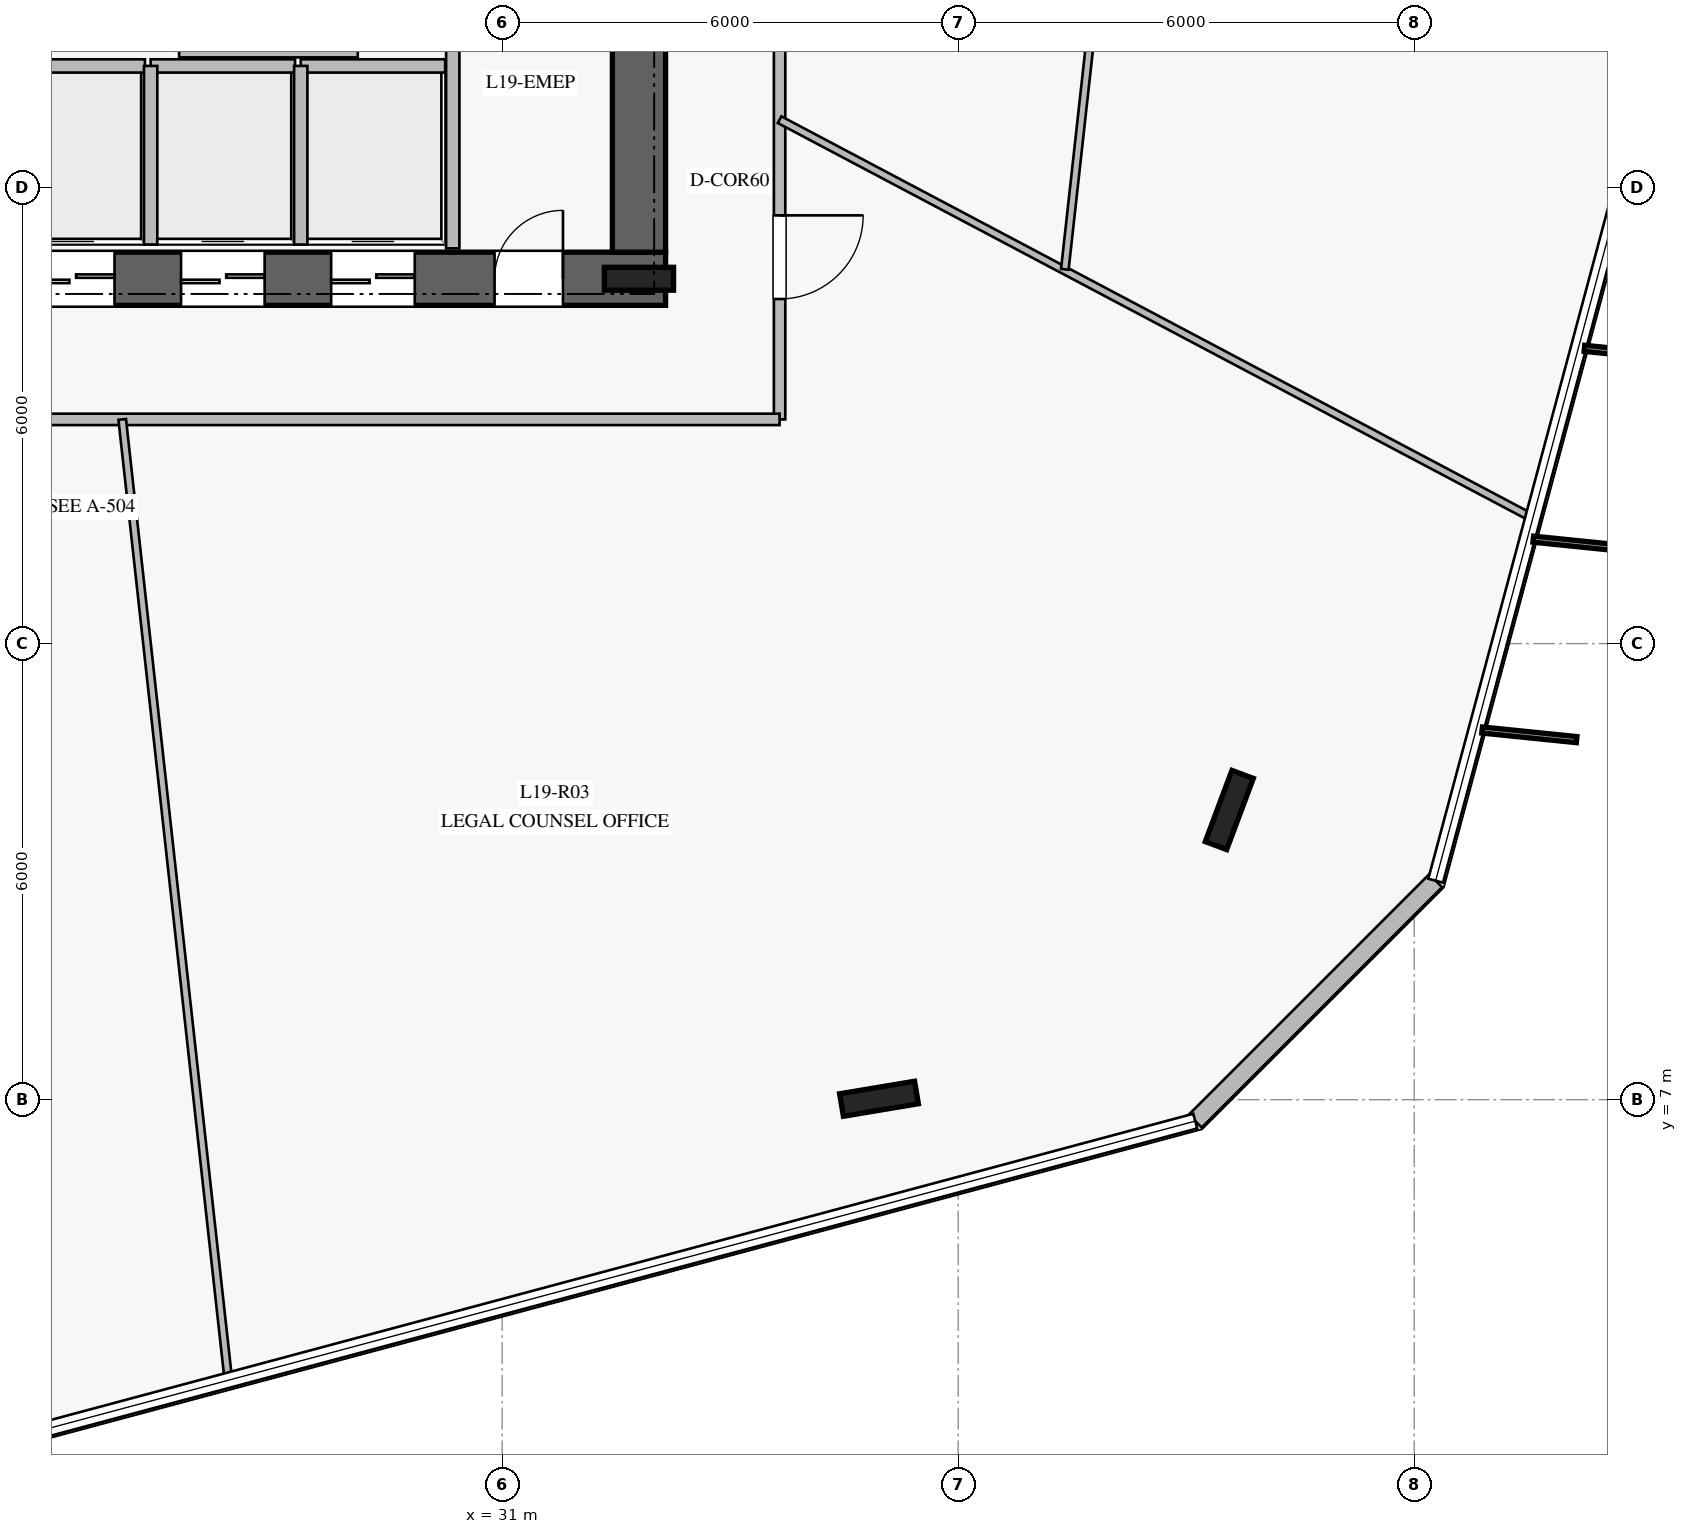
"""IFC4 building model, lengths in metres.
Left out: names, types, materials, properties, quantities, classifications, styles, units other than length and angle.
Written with IfcOpenShell. Run it as: python <this file> out.ifc"""

import sys

from ifc_helpers import new_model, si_unit, direction, frame, frame_2d, origin, origin_2d, place, context, subcontext, project, spatial, rectangle, i_section, extrude, element, fill, save


model = new_model("IFC4")
c1 = context("Model", 3, precision=1e-05, world=origin(), true_north=direction((0.0, 1.0)))
c2 = subcontext(c1, "Body", "Model", "MODEL_VIEW")
j1 = project(units=[si_unit("LENGTHUNIT", "METRE"), si_unit("PLANEANGLEUNIT", "RADIAN")], contexts=[c1])
p1 = place(None, origin())
s1 = spatial("IfcSite", under=j1, at=p1, CompositionType="ELEMENT")
p2 = place(p1, origin())
s2 = spatial("IfcBuilding", under=s1, at=p2, CompositionType="ELEMENT")
p3 = place(p2, frame((0.0, 0.0, 80.0)))
s3 = spatial("IfcBuildingStorey", under=s2, at=p3, CompositionType="ELEMENT", Elevation=80.0)
p4 = place(p3, frame((16.85, 17.8, 0.0), z_axis=(0.0, 0.0, 1.0), x_axis=(1.0, 0.0, 0.0)))
e1 = element("IfcWall", 1, at=p4, inside=s3, PredefinedType="SHEAR", context=c2, shape_type="SweptSolid", body=[
    extrude(rectangle(XDim=16.3, YDim=0.7, at=frame_2d((8.15, 0.0))), origin(), (0.0, 0.0, 1.0), 3.76),
])
p5 = place(p4, frame((5.1, 0.0, 0.0)))
e2 = element("IfcOpeningElement", 2, at=p5, cuts=e1, PredefinedType="OPENING", context=c2, shape_type="SweptSolid", body=[
    extrude(rectangle(XDim=1.2, YDim=2.25, at=frame_2d((0.6, 1.125))), frame((0.0, 0.36, 0.0), z_axis=(0.0, -1.0, 0.0), x_axis=(1.0, 0.0, 0.0)), (0.0, 0.0, 1.0), 0.72),
])
p6 = place(p4, frame((14.05, 0.0, 0.0)))
e3 = element("IfcOpeningElement", 3, at=p6, cuts=e1, PredefinedType="OPENING", context=c2, shape_type="SweptSolid", body=[
    extrude(rectangle(XDim=0.9, YDim=2.1, at=frame_2d((0.45, 1.05))), frame((0.0, 0.36, 0.0), z_axis=(0.0, -1.0, 0.0), x_axis=(1.0, 0.0, 0.0)), (0.0, 0.0, 1.0), 0.72),
])
p7 = place(p4, frame((7.95, 0.0, 0.0)))
e4 = element("IfcOpeningElement", 4, at=p7, cuts=e1, PredefinedType="OPENING", context=c2, shape_type="SweptSolid", body=[
    extrude(rectangle(XDim=1.1, YDim=2.2, at=frame_2d((0.55, 1.1))), frame((0.0, 0.36, 0.0), z_axis=(0.0, -1.0, 0.0), x_axis=(1.0, 0.0, 0.0)), (0.0, 0.0, 1.0), 0.72),
])
p8 = place(p4, frame((9.925, 0.0, 0.0)))
e5 = element("IfcOpeningElement", 5, at=p8, cuts=e1, PredefinedType="OPENING", context=c2, shape_type="SweptSolid", body=[
    extrude(rectangle(XDim=1.1, YDim=2.2, at=frame_2d((0.55, 1.1))), frame((0.0, 0.36, 0.0), z_axis=(0.0, -1.0, 0.0), x_axis=(1.0, 0.0, 0.0)), (0.0, 0.0, 1.0), 0.72),
])
p9 = place(p4, frame((11.9, 0.0, 0.0)))
e6 = element("IfcOpeningElement", 6, at=p9, cuts=e1, PredefinedType="OPENING", context=c2, shape_type="SweptSolid", body=[
    extrude(rectangle(XDim=1.1, YDim=2.2, at=frame_2d((0.55, 1.1))), frame((0.0, 0.36, 0.0), z_axis=(0.0, -1.0, 0.0), x_axis=(1.0, 0.0, 0.0)), (0.0, 0.0, 1.0), 0.72),
])
p10 = place(p3, frame((32.8, 18.15, 0.0), z_axis=(0.0, 0.0, 1.0), x_axis=(0.0, 1.0, 0.0)))
e7 = element("IfcWall", 7, at=p10, inside=s3, PredefinedType="SHEAR", context=c2, shape_type="SweptSolid", body=[
    extrude(rectangle(XDim=13.7, YDim=0.7, at=frame_2d((6.85, 0.0))), origin(), (0.0, 0.0, 1.0), 3.76),
])
p11 = place(p3, frame((32.8, 17.8, 0.0), z_axis=(0.0, 0.0, 1.0), x_axis=(1.0, 0.0, 0.0)))
e8 = element("IfcColumn", 8, at=p11, inside=s3, PredefinedType="COLUMN", context=c2, shape_type="SweptSolid", body=[
    extrude(i_section(OverallWidth=0.302, OverallDepth=0.91, WebThickness=0.021, FlangeThickness=0.04, at=origin_2d()), origin(), (0.0, 0.0, 1.0), 4.0),
])
for number, where, z_axis, x_axis in (
    (9, (35.958, 7.012, 0.0), (0.0, 0.0, 1.0), (0.986, 0.165, 0.0)),
    (10, (40.567, 10.811, 0.0), (0.0, 0.0, 1.0), (0.35, 0.937, 0.0)),
):
    element("IfcColumn", number, at=place(p3, frame(where, z_axis=z_axis, x_axis=x_axis)), inside=s3, PredefinedType="COLUMN", context=c2, shape_type="SweptSolid", body=[
        extrude(i_section(OverallWidth=0.3, OverallDepth=1.0, WebThickness=0.019, FlangeThickness=0.036, at=origin_2d()), origin(), (0.0, 0.0, 1.0), 4.0),
    ])
p12 = place(p3, frame((40.119, 6.718, 0.0), z_axis=(0.0, 0.0, 1.0), x_axis=(0.707106781187, 0.707106781187, 0.0)))
e11 = element("IfcWall", 11, at=p12, inside=s3, PredefinedType="STANDARD", context=c2, shape_type="SweptSolid", body=[
    extrude(rectangle(XDim=4.473, YDim=0.24, at=frame_2d((2.237, 0.0))), origin(), (0.0, 0.0, 1.0), 3.76),
])
p13 = place(p3, frame((30.35, 18.2, 0.0), z_axis=(0.0, 0.0, 1.0), x_axis=(0.0, 1.0, 0.0)))
e12 = element("IfcWall", 12, at=p13, inside=s3, PredefinedType="PARTITIONING", context=c2, shape_type="SweptSolid", body=[
    extrude(rectangle(XDim=3.48, YDim=0.175, at=frame_2d((1.74, 0.0))), origin(), (0.0, 0.0, 1.0), 3.76),
])
p14 = place(p3, frame((24.4, 20.6, 0.0), z_axis=(0.0, 0.0, 1.0), x_axis=(1.0, 0.0, 0.0)))
e13 = element("IfcWall", 13, at=p14, inside=s3, PredefinedType="PARTITIONING", context=c2, shape_type="SweptSolid", body=[
    extrude(rectangle(XDim=1.9, YDim=0.175, at=frame_2d((0.95, 0.0))), origin(), (0.0, 0.0, 1.0), 3.76),
])
p15 = place(p3, frame((26.375, 20.6, 0.0), z_axis=(0.0, 0.0, 1.0), x_axis=(1.0, 0.0, 0.0)))
e14 = element("IfcWall", 14, at=p15, inside=s3, PredefinedType="PARTITIONING", context=c2, shape_type="SweptSolid", body=[
    extrude(rectangle(XDim=1.9, YDim=0.175, at=frame_2d((0.95, 0.0))), origin(), (0.0, 0.0, 1.0), 3.76),
])
p16 = place(p3, frame((26.375, 18.25, 0.0), z_axis=(0.0, 0.0, 1.0), x_axis=(0.0, 1.0, 0.0)))
e15 = element("IfcWall", 15, at=p16, inside=s3, PredefinedType="PARTITIONING", context=c2, shape_type="SweptSolid", body=[
    extrude(rectangle(XDim=2.35, YDim=0.175, at=frame_2d((1.175, 0.0))), origin(), (0.0, 0.0, 1.0), 3.76),
])
p17 = place(p3, frame((28.35, 20.6, 0.0), z_axis=(0.0, 0.0, 1.0), x_axis=(1.0, 0.0, 0.0)))
e16 = element("IfcWall", 16, at=p17, inside=s3, PredefinedType="PARTITIONING", context=c2, shape_type="SweptSolid", body=[
    extrude(rectangle(XDim=1.9, YDim=0.175, at=frame_2d((0.95, 0.0))), origin(), (0.0, 0.0, 1.0), 3.76),
])
for number, where, z_axis, x_axis in (
    (17, (28.35, 18.25, 0.0), (0.0, 0.0, 1.0), (0.0, 1.0, 0.0)),
    (18, (26.75, 20.8, 0.0), (0.0, 0.0, 1.0), (1.0, 0.0, 0.0)),
):
    element("IfcWall", number, at=place(p3, frame(where, z_axis=z_axis, x_axis=x_axis)), inside=s3, PredefinedType="PARTITIONING", context=c2, shape_type="SweptSolid", body=[
        extrude(rectangle(XDim=2.35, YDim=0.175, at=frame_2d((1.175, 0.0))), origin(), (0.0, 0.0, 1.0), 3.76),
    ])
p18 = place(p3, frame((34.65, 34.05, 0.0), z_axis=(0.0, 0.0, 1.0), x_axis=(0.0, -1.0, 0.0)))
e19 = element("IfcWall", 19, at=p18, inside=s3, PredefinedType="PARTITIONING", context=c2, shape_type="SweptSolid", body=[
    extrude(rectangle(XDim=18.1, YDim=0.15, at=frame_2d((9.05, 0.0))), origin(), (0.0, 0.0, 1.0), 3.21),
])
p19 = place(p18, frame((15.416, 0.0, 0.0)))
e20 = element("IfcOpeningElement", 20, at=p19, cuts=e19, PredefinedType="OPENING", context=c2, shape_type="SweptSolid", body=[
    extrude(rectangle(XDim=1.1, YDim=2.2, at=frame_2d((0.55, 1.1))), frame((0.0, 0.085, 0.0), z_axis=(0.0, -1.0, 0.0), x_axis=(1.0, 0.0, 0.0)), (0.0, 0.0, 1.0), 0.17),
])
p20 = place(p18, frame((10.251, 0.0, 0.0)))
e21 = element("IfcOpeningElement", 21, at=p20, cuts=e19, PredefinedType="OPENING", context=c2, shape_type="SweptSolid", body=[
    extrude(rectangle(XDim=1.1, YDim=2.2, at=frame_2d((0.55, 1.1))), frame((0.0, 0.085, 0.0), z_axis=(0.0, -1.0, 0.0), x_axis=(1.0, 0.0, 0.0)), (0.0, 0.0, 1.0), 0.17),
])
p21 = place(p18, frame((4.014, 0.0, 0.0)))
e22 = element("IfcOpeningElement", 22, at=p21, cuts=e19, PredefinedType="OPENING", context=c2, shape_type="SweptSolid", body=[
    extrude(rectangle(XDim=1.1, YDim=2.2, at=frame_2d((0.55, 1.1))), frame((0.0, 0.085, 0.0), z_axis=(0.0, -1.0, 0.0), x_axis=(1.0, 0.0, 0.0)), (0.0, 0.0, 1.0), 0.17),
])
p22 = place(p3, frame((34.65, 15.95, 0.0), z_axis=(0.0, 0.0, 1.0), x_axis=(-1.0, 0.0, 0.0)))
e23 = element("IfcWall", 23, at=p22, inside=s3, PredefinedType="PARTITIONING", context=c2, shape_type="SweptSolid", body=[
    extrude(rectangle(XDim=19.3, YDim=0.15, at=frame_2d((9.65, 0.0))), origin(), (0.0, 0.0, 1.0), 3.21),
])
p23 = place(p22, frame((17.013, 0.0, 0.0)))
e24 = element("IfcOpeningElement", 24, at=p23, cuts=e23, PredefinedType="OPENING", context=c2, shape_type="SweptSolid", body=[
    extrude(rectangle(XDim=1.1, YDim=2.2, at=frame_2d((0.55, 1.1))), frame((0.0, 0.085, 0.0), z_axis=(0.0, -1.0, 0.0), x_axis=(1.0, 0.0, 0.0)), (0.0, 0.0, 1.0), 0.17),
])
p24 = place(p22, frame((11.951, 0.0, 0.0)))
e25 = element("IfcOpeningElement", 25, at=p24, cuts=e23, PredefinedType="OPENING", context=c2, shape_type="SweptSolid", body=[
    extrude(rectangle(XDim=1.1, YDim=2.2, at=frame_2d((0.55, 1.1))), frame((0.0, 0.085, 0.0), z_axis=(0.0, -1.0, 0.0), x_axis=(1.0, 0.0, 0.0)), (0.0, 0.0, 1.0), 0.17),
])
p25 = place(p3, frame((26.001, 15.95, 0.0), z_axis=(0.0, 0.0, 1.0), x_axis=(0.109844945692, -0.993948735049, 0.0)))
e26 = element("IfcWall", 26, at=p25, inside=s3, PredefinedType="MOVABLE", context=c2, shape_type="SweptSolid", body=[
    extrude(rectangle(XDim=12.7, YDim=0.1, at=frame_2d((6.35, 0.0))), origin(), (0.0, 0.0, 1.0), 3.06),
])
p26 = place(p3, frame((34.65, 19.893, 0.0), z_axis=(0.0, 0.0, 1.0), x_axis=(0.883895590045, -0.467684280149, 0.0)))
e27 = element("IfcWall", 27, at=p26, inside=s3, PredefinedType="MOVABLE", context=c2, shape_type="SweptSolid", body=[
    extrude(rectangle(XDim=11.194, YDim=0.1, at=frame_2d((5.597, 0.0))), origin(), (0.0, 0.0, 1.0), 3.06),
])
p27 = place(p3, frame((38.403, 17.924, 0.0), z_axis=(0.0, 0.0, 1.0), x_axis=(0.110030740607, 0.99392818459, 0.0)))
e28 = element("IfcWall", 28, at=p27, inside=s3, PredefinedType="MOVABLE", context=c2, shape_type="SweptSolid", body=[
    extrude(rectangle(XDim=9.561, YDim=0.1, at=frame_2d((4.781, 0.0))), origin(), (0.0, 0.0, 1.0), 3.76),
])
p28 = place(p27, frame((4.281, 0.0, 0.0)))
e29 = element("IfcOpeningElement", 29, at=p28, cuts=e28, PredefinedType="OPENING", context=c2, shape_type="SweptSolid", body=[
    extrude(rectangle(XDim=1.0, YDim=2.15, at=frame_2d((0.5, 1.075))), frame((0.0, 0.06, 0.0), z_axis=(0.0, -1.0, 0.0), x_axis=(1.0, 0.0, 0.0)), (0.0, 0.0, 1.0), 0.12),
])
p29 = place(p6, origin())
e30 = element("IfcDoor", 30, at=p29, inside=s3, OperationType="SINGLE_SWING_RIGHT", PredefinedType="DOOR", context=c2, shape_type="SweptSolid", body=[
    extrude(rectangle(XDim=0.9, YDim=2.1, at=frame_2d((0.45, 1.05))), frame((0.0, 0.025, 0.0), z_axis=(0.0, -1.0, 0.0), x_axis=(1.0, 0.0, 0.0)), (0.0, 0.0, 1.0), 0.05),
])
fill(e3, e30)
p30 = place(p7, origin())
e31 = element("IfcDoor", 31, at=p30, inside=s3, OperationType="DOUBLE_DOOR_SLIDING", PredefinedType="DOOR", context=c2, shape_type="SweptSolid", body=[
    extrude(rectangle(XDim=1.1, YDim=2.2, at=frame_2d((0.55, 1.1))), frame((0.0, 0.025, 0.0), z_axis=(0.0, -1.0, 0.0), x_axis=(1.0, 0.0, 0.0)), (0.0, 0.0, 1.0), 0.05),
])
fill(e4, e31)
p31 = place(p8, origin())
e32 = element("IfcDoor", 32, at=p31, inside=s3, OperationType="DOUBLE_DOOR_SLIDING", PredefinedType="DOOR", context=c2, shape_type="SweptSolid", body=[
    extrude(rectangle(XDim=1.1, YDim=2.2, at=frame_2d((0.55, 1.1))), frame((0.0, 0.025, 0.0), z_axis=(0.0, -1.0, 0.0), x_axis=(1.0, 0.0, 0.0)), (0.0, 0.0, 1.0), 0.05),
])
fill(e5, e32)
p32 = place(p9, origin())
e33 = element("IfcDoor", 33, at=p32, inside=s3, OperationType="DOUBLE_DOOR_SLIDING", PredefinedType="DOOR", context=c2, shape_type="SweptSolid", body=[
    extrude(rectangle(XDim=1.1, YDim=2.2, at=frame_2d((0.55, 1.1))), frame((0.0, 0.025, 0.0), z_axis=(0.0, -1.0, 0.0), x_axis=(1.0, 0.0, 0.0)), (0.0, 0.0, 1.0), 0.05),
])
fill(e6, e33)
p33 = place(p19, origin())
e34 = element("IfcDoor", 34, at=p33, inside=s3, OperationType="SINGLE_SWING_LEFT", PredefinedType="DOOR", context=c2, shape_type="SweptSolid", body=[
    extrude(rectangle(XDim=1.1, YDim=2.2, at=frame_2d((0.55, 1.1))), frame((0.0, 0.025, 0.0), z_axis=(0.0, -1.0, 0.0), x_axis=(1.0, 0.0, 0.0)), (0.0, 0.0, 1.0), 0.05),
])
fill(e20, e34)
save(model, sys.argv[1])
